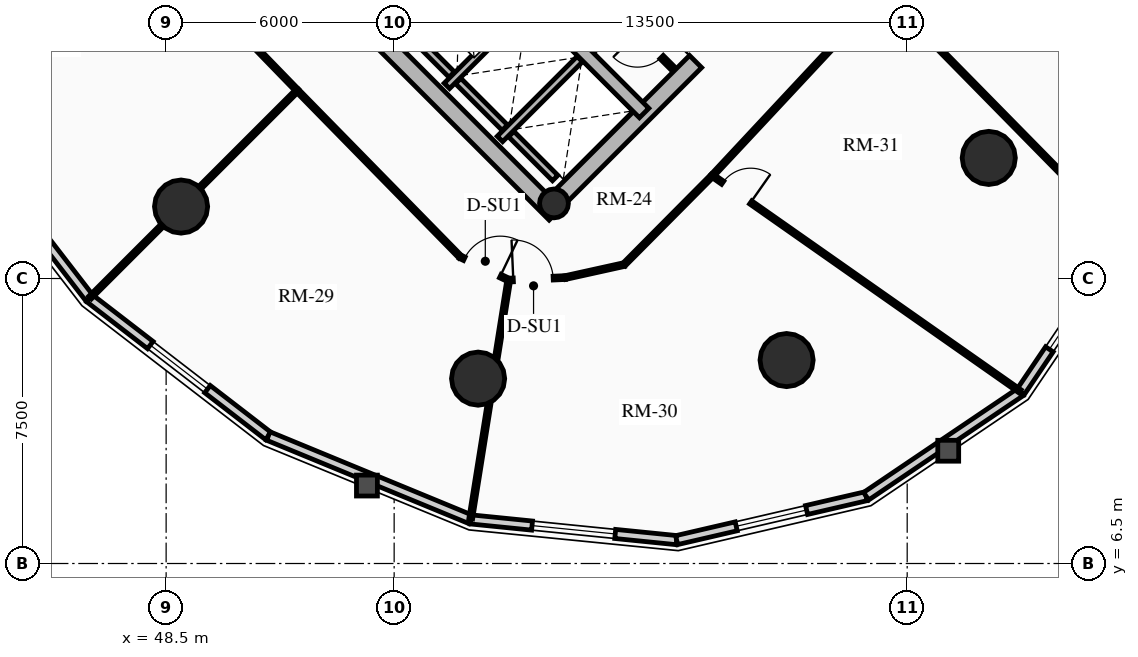
"""IFC4 building model, lengths in metres.
Left out: names, types, materials, properties, quantities, classifications, styles, units other than length and angle.
Written with IfcOpenShell. Run it as: python <this file> out.ifc"""

import sys

from ifc_helpers import new_model, si_unit, direction, frame, frame_2d, origin, origin_2d, place, context, subcontext, project, spatial, rectangle, circle, hollow_circle, extrude, source, transform, mapped, element, fill, save


model = new_model("IFC4")
c1 = context("Model", 3, precision=1e-05, world=origin(), true_north=direction((0.0, 1.0)))
c2 = subcontext(c1, "Body", "Model", "MODEL_VIEW")
j1 = project(units=[si_unit("LENGTHUNIT", "METRE"), si_unit("PLANEANGLEUNIT", "RADIAN")], contexts=[c1])
p1 = place(None, origin())
s1 = spatial("IfcSite", under=j1, at=p1, CompositionType="ELEMENT")
p2 = place(p1, origin())
s2 = spatial("IfcBuilding", under=s1, at=p2, CompositionType="ELEMENT")
p3 = place(p2, frame((0.0, 0.0, 96.34)))
s3 = spatial("IfcBuildingStorey", under=s2, at=p3, CompositionType="ELEMENT", Elevation=96.34)
p4 = place(p3, frame((58.737, 15.697, 0.0), z_axis=(0.0, 0.0, 1.0), x_axis=(-0.707106781187, 0.707106781187, 0.0)))
e1 = element("IfcWall", 1, at=p4, inside=s3, PredefinedType="SHEAR", context=c2, shape_type="SweptSolid", body=[
    extrude(rectangle(XDim=14.2, YDim=0.45, at=frame_2d((7.1, 0.0))), origin(), (0.0, 0.0, 1.0), 2.91),
])
p5 = place(p3, frame((58.578, 15.856, 0.0), z_axis=(0.0, 0.0, 1.0), x_axis=(0.707106781187, 0.707106781187, 0.0)))
e2 = element("IfcWall", 2, at=p5, inside=s3, PredefinedType="SHEAR", context=c2, shape_type="SweptSolid", body=[
    extrude(rectangle(XDim=10.7, YDim=0.45, at=frame_2d((5.35, 0.0))), origin(), (0.0, 0.0, 1.0), 2.91),
])
m1 = source(origin(), c2, "Body", "SweptSolid", [
    extrude(rectangle(XDim=1.5, YDim=2.02, at=frame_2d((0.75, 1.01))), frame((0.0, 0.235, 0.0), z_axis=(0.0, -1.0, 0.0), x_axis=(1.0, 0.0, 0.0)), (0.0, 0.0, 1.0), 0.47),
])
p6 = place(p5, frame((5.45, 0.0, 0.0)))
e3 = element("IfcOpeningElement", 3, at=p6, cuts=e2, PredefinedType="OPENING", context=c2, shape_type="MappedRepresentation", body=[
    mapped(m1, transform((0.0, 0.0, 0.0), x_axis=(1.0, 0.0, 0.0), y_axis=(0.0, 1.0, 0.0), z_axis=(0.0, 0.0, 1.0), scale=1.0)),
])
p7 = place(p3, frame((61.078, 18.355, 0.0), z_axis=(0.0, 0.0, 1.0), x_axis=(-0.707106781187, 0.707106781187, 0.0)))
e4 = element("IfcWall", 4, at=p7, inside=s3, PredefinedType="SHEAR", context=c2, shape_type="SweptSolid", body=[
    extrude(rectangle(XDim=13.75, YDim=0.35, at=frame_2d((6.875, 0.0))), origin(), (0.0, 0.0, 1.0), 2.91),
])
m2 = source(origin(), c2, "Body", "SweptSolid", [
    extrude(rectangle(XDim=1.1, YDim=2.015, at=frame_2d((0.55, 1.007))), frame((0.0, 0.185, 0.0), z_axis=(0.0, -1.0, 0.0), x_axis=(1.0, 0.0, 0.0)), (0.0, 0.0, 1.0), 0.37),
])
p8 = place(p7, frame((4.875, 0.0, 0.0)))
e5 = element("IfcOpeningElement", 5, at=p8, cuts=e4, PredefinedType="OPENING", context=c2, shape_type="MappedRepresentation", body=[
    mapped(m2, transform((0.0, 0.0, 0.0), x_axis=(1.0, 0.0, 0.0), y_axis=(0.0, 1.0, 0.0), z_axis=(0.0, 0.0, 1.0), scale=1.0)),
])
m3 = source(origin(), c2, "Body", "SweptSolid", [
    extrude(rectangle(XDim=1.15, YDim=2.02, at=frame_2d((0.575, 1.01))), frame((0.0, 0.185, 0.0), z_axis=(0.0, -1.0, 0.0), x_axis=(1.0, 0.0, 0.0)), (0.0, 0.0, 1.0), 0.37),
])
p9 = place(p7, frame((7.295, 0.0, 0.0)))
e6 = element("IfcOpeningElement", 6, at=p9, cuts=e4, PredefinedType="OPENING", context=c2, shape_type="MappedRepresentation", body=[
    mapped(m3, transform((0.0, 0.0, 0.0), x_axis=(1.0, 0.0, 0.0), y_axis=(0.0, 1.0, 0.0), z_axis=(0.0, 0.0, 1.0), scale=1.0)),
])
p10 = place(p3, frame((58.706, 15.976, 0.0), z_axis=(0.0, 0.0, 1.0), x_axis=(0.707106781187, 0.707106781187, 0.0)))
e7 = element("IfcColumn", 7, at=p10, inside=s3, PredefinedType="COLUMN", context=c2, shape_type="SweptSolid", body=[
    extrude(hollow_circle(Radius=0.38, WallThickness=0.032, at=origin_2d()), origin(), (0.0, 0.0, 1.0), 2.91),
])
for number, where, z_axis, x_axis in (
    (8, (48.893, 15.893, 0.0), (0.0, 0.0, 1.0), (1.0, 0.0, 0.0)),
    (9, (56.709, 11.365, 0.0), (0.0, 0.0, 1.0), (1.0, 0.0, 0.0)),
    (10, (64.827, 11.854, 0.0), (0.0, 0.0, 1.0), (1.0, 0.0, 0.0)),
    (11, (70.146, 17.173, 0.0), (0.0, 0.0, 1.0), (1.0, 0.0, 0.0)),
):
    element("IfcColumn", number, at=place(p3, frame(where, z_axis=z_axis, x_axis=x_axis)), inside=s3, PredefinedType="USERDEFINED", context=c2, shape_type="SweptSolid", body=[
        extrude(circle(Radius=0.7, at=origin_2d()), origin(), (0.0, 0.0, 1.0), 2.91),
    ])
p11 = place(p3, frame((46.483, 13.483, 0.0), z_axis=(0.0, 0.0, 1.0), x_axis=(-0.61054437102, 0.791982052206, 0.0)))
e12 = element("IfcWall", 12, at=p11, inside=s3, PredefinedType="SOLIDWALL", context=c2, shape_type="SweptSolid", body=[
    extrude(rectangle(XDim=5.942, YDim=0.24, at=frame_2d((2.971, 0.0))), origin(), (0.0, 0.0, 1.0), 2.179),
])
p12 = place(p3, frame((51.189, 9.855, 0.0), z_axis=(0.0, 0.0, 1.0), x_axis=(-0.791982052206, 0.61054437102, 0.0)))
e13 = element("IfcWall", 13, at=p12, inside=s3, PredefinedType="SOLIDWALL", context=c2, shape_type="SweptSolid", body=[
    extrude(rectangle(XDim=5.942, YDim=0.24, at=frame_2d((2.971, 0.0))), origin(), (0.0, 0.0, 1.0), 2.179),
])
m4 = source(origin(), c2, "Body", "SweptSolid", [
    extrude(rectangle(XDim=1.9, YDim=1.35, at=frame_2d((0.95, 0.675))), frame((0.0, 0.13, 0.0), z_axis=(0.0, -1.0, 0.0), x_axis=(1.0, 0.0, 0.0)), (0.0, 0.0, 1.0), 0.26),
])
p13 = place(p12, frame((2.021, 0.0, 0.65)))
e14 = element("IfcOpeningElement", 14, at=p13, cuts=e13, PredefinedType="OPENING", context=c2, shape_type="MappedRepresentation", body=[
    mapped(m4, transform((0.0, 0.0, 0.0), x_axis=(1.0, 0.0, 0.0), y_axis=(0.0, 1.0, 0.0), z_axis=(0.0, 0.0, 1.0), scale=1.0)),
])
p14 = place(p3, frame((56.513, 7.661, 0.0), z_axis=(0.0, 0.0, 1.0), x_axis=(-0.924563909604, 0.381027003055, 0.0)))
e15 = element("IfcWall", 15, at=p14, inside=s3, PredefinedType="SOLIDWALL", context=c2, shape_type="SweptSolid", body=[
    extrude(rectangle(XDim=5.758, YDim=0.24, at=frame_2d((2.879, 0.0))), origin(), (0.0, 0.0, 1.0), 2.179),
])
p15 = place(p3, frame((61.933, 7.115, 0.0), z_axis=(0.0, 0.0, 1.0), x_axis=(-0.994971754311, 0.10015591906, 0.0)))
e16 = element("IfcWall", 16, at=p15, inside=s3, PredefinedType="SOLIDWALL", context=c2, shape_type="SweptSolid", body=[
    extrude(rectangle(XDim=5.448, YDim=0.24, at=frame_2d((2.724, 0.0))), origin(), (0.0, 0.0, 1.0), 2.179),
])
m5 = source(origin(), c2, "Body", "SweptSolid", [
    extrude(rectangle(XDim=2.2, YDim=1.35, at=frame_2d((1.1, 0.675))), frame((0.0, 0.13, 0.0), z_axis=(0.0, -1.0, 0.0), x_axis=(1.0, 0.0, 0.0)), (0.0, 0.0, 1.0), 0.26),
])
p16 = place(p15, frame((1.624, 0.0, 0.65)))
e17 = element("IfcOpeningElement", 17, at=p16, cuts=e16, PredefinedType="OPENING", context=c2, shape_type="MappedRepresentation", body=[
    mapped(m5, transform((0.0, 0.0, 0.0), x_axis=(1.0, 0.0, 0.0), y_axis=(0.0, 1.0, 0.0), z_axis=(0.0, 0.0, 1.0), scale=1.0)),
])
p17 = place(p3, frame((66.92, 8.271, 0.0), z_axis=(0.0, 0.0, 1.0), x_axis=(-0.974165631126, -0.225834725257, 0.0)))
e18 = element("IfcWall", 18, at=p17, inside=s3, PredefinedType="SOLIDWALL", context=c2, shape_type="SweptSolid", body=[
    extrude(rectangle(XDim=5.119, YDim=0.24, at=frame_2d((2.56, 0.0))), origin(), (0.0, 0.0, 1.0), 2.179),
])
p18 = place(p17, frame((1.609, 0.0, 0.65)))
e19 = element("IfcOpeningElement", 19, at=p18, cuts=e18, PredefinedType="OPENING", context=c2, shape_type="MappedRepresentation", body=[
    mapped(m4, transform((0.0, 0.0, 0.0), x_axis=(1.0, 0.0, 0.0), y_axis=(0.0, 1.0, 0.0), z_axis=(0.0, 0.0, 1.0), scale=1.0)),
])
p19 = place(p3, frame((70.985, 11.015, 0.0), z_axis=(0.0, 0.0, 1.0), x_axis=(-0.828781148131, -0.559572880421, 0.0)))
e20 = element("IfcWall", 20, at=p19, inside=s3, PredefinedType="SOLIDWALL", context=c2, shape_type="SweptSolid", body=[
    extrude(rectangle(XDim=4.905, YDim=0.24, at=frame_2d((2.452, 0.0))), origin(), (0.0, 0.0, 1.0), 2.179),
])
p20 = place(p3, frame((73.729, 15.08, 0.0), z_axis=(0.0, 0.0, 1.0), x_axis=(-0.559572880421, -0.828781148131, 0.0)))
e21 = element("IfcWall", 21, at=p20, inside=s3, PredefinedType="SOLIDWALL", context=c2, shape_type="SweptSolid", body=[
    extrude(rectangle(XDim=4.905, YDim=0.24, at=frame_2d((2.452, 0.0))), origin(), (0.0, 0.0, 1.0), 2.179),
])
p21 = place(p20, frame((1.352, 0.0, 0.65)))
e22 = element("IfcOpeningElement", 22, at=p21, cuts=e21, PredefinedType="OPENING", context=c2, shape_type="MappedRepresentation", body=[
    mapped(m5, transform((0.0, 0.0, 0.0), x_axis=(1.0, 0.0, 0.0), y_axis=(0.0, 1.0, 0.0), z_axis=(0.0, 0.0, 1.0), scale=1.0)),
])
p22 = place(p3, frame((55.888, 19.069, 0.0), z_axis=(0.0, 0.0, 1.0), x_axis=(0.707106781187, 0.707106781187, 0.0)))
e23 = element("IfcWall", 23, at=p22, inside=s3, PredefinedType="SHEAR", context=c2, shape_type="SweptSolid", body=[
    extrude(rectangle(XDim=2.97, YDim=0.2, at=frame_2d((1.485, 0.0))), origin(), (0.0, 0.0, 1.0), 2.91),
])
p23 = place(p3, frame((56.015, 19.366, 0.0), z_axis=(0.0, 0.0, 1.0), x_axis=(-0.707106781187, 0.707106781187, 0.0)))
e24 = element("IfcWall", 24, at=p23, inside=s3, PredefinedType="SHEAR", context=c2, shape_type="SweptSolid", body=[
    extrude(rectangle(XDim=2.44, YDim=0.2, at=frame_2d((1.22, 0.0))), origin(), (0.0, 0.0, 1.0), 2.91),
])
p24 = place(p3, frame((57.284, 17.673, 0.0), z_axis=(0.0, 0.0, 1.0), x_axis=(0.707147878904, 0.70706568108, 0.0)))
e25 = element("IfcWall", 25, at=p24, inside=s3, PredefinedType="SHEAR", context=c2, shape_type="SweptSolid", body=[
    extrude(rectangle(XDim=2.97, YDim=0.2, at=frame_2d((1.485, 0.0))), origin(), (0.0, 0.0, 1.0), 2.91),
])
p25 = place(p3, frame((57.412, 17.97, 0.0), z_axis=(0.0, 0.0, 1.0), x_axis=(-0.707106781187, 0.707106781187, 0.0)))
e26 = element("IfcWall", 26, at=p25, inside=s3, PredefinedType="SHEAR", context=c2, shape_type="SweptSolid", body=[
    extrude(rectangle(XDim=1.735, YDim=0.2, at=frame_2d((0.867, 0.0))), origin(), (0.0, 0.0, 1.0), 2.91),
])
p26 = place(p3, frame((58.737, 16.644, 0.0), z_axis=(0.0, 0.0, 1.0), x_axis=(-0.707032117043, 0.707181437447, 0.0)))
e27 = element("IfcWall", 27, at=p26, inside=s3, PredefinedType="SHEAR", context=c2, shape_type="SweptSolid", body=[
    extrude(rectangle(XDim=1.635, YDim=0.2, at=frame_2d((0.817, 0.0))), origin(), (0.0, 0.0, 1.0), 2.91),
])
p27 = place(p3, frame((61.835, 19.529, 0.0), z_axis=(0.0, 0.0, 1.0), x_axis=(-0.707174592913, 0.707038962956, 0.0)))
e28 = element("IfcWall", 28, at=p27, inside=s3, PredefinedType="PARTITIONING", context=c2, shape_type="SweptSolid", body=[
    extrude(rectangle(XDim=1.8, YDim=0.125, at=frame_2d((0.9, 0.0))), origin(), (0.0, 0.0, 1.0), 2.655),
])
m6 = source(origin(), c2, "Body", "SweptSolid", [
    extrude(rectangle(XDim=0.9, YDim=2.005, at=frame_2d((0.45, 1.002))), frame((0.0, 0.073, 0.0), z_axis=(0.0, -1.0, 0.0), x_axis=(1.0, 0.0, 0.0)), (0.0, 0.0, 1.0), 0.145),
])
p28 = place(p27, frame((0.42, 0.0, 0.0)))
e29 = element("IfcOpeningElement", 29, at=p28, cuts=e28, PredefinedType="OPENING", context=c2, shape_type="MappedRepresentation", body=[
    mapped(m6, transform((0.0, 0.0, 0.0), x_axis=(1.0, 0.0, 0.0), y_axis=(0.0, 1.0, 0.0), z_axis=(0.0, 0.0, 1.0), scale=1.0)),
])
p29 = place(p3, frame((47.763, 23.265, 0.0), z_axis=(0.0, 0.0, 1.0), x_axis=(0.696243493404, -0.717805682544, 0.0)))
e30 = element("IfcWall", 30, at=p29, inside=s3, PredefinedType="MOVABLE", context=c2, shape_type="SweptSolid", body=[
    extrude(rectangle(XDim=6.012, YDim=0.1, at=frame_2d((3.006, 0.0))), origin(), (0.0, 0.0, 1.0), 2.655),
])
m7 = source(origin(), c2, "Body", "SweptSolid", [
    extrude(rectangle(XDim=1.05, YDim=2.015, at=frame_2d((0.525, 1.007))), frame((0.0, 0.06, 0.0), z_axis=(0.0, -1.0, 0.0), x_axis=(1.0, 0.0, 0.0)), (0.0, 0.0, 1.0), 0.12),
])
p30 = place(p29, frame((2.481, 0.0, 0.0)))
e31 = element("IfcOpeningElement", 31, at=p30, cuts=e30, PredefinedType="OPENING", context=c2, shape_type="MappedRepresentation", body=[
    mapped(m7, transform((0.0, 0.0, 0.0), x_axis=(1.0, 0.0, 0.0), y_axis=(0.0, 1.0, 0.0), z_axis=(0.0, 0.0, 1.0), scale=1.0)),
])
p31 = place(p3, frame((51.949, 18.949, 0.0), z_axis=(0.0, 0.0, 1.0), x_axis=(0.699840807936, -0.714298847506, 0.0)))
e32 = element("IfcWall", 32, at=p31, inside=s3, PredefinedType="MOVABLE", context=c2, shape_type="SweptSolid", body=[
    extrude(rectangle(XDim=6.13, YDim=0.1, at=frame_2d((3.065, 0.0))), origin(), (0.0, 0.0, 1.0), 2.225),
])
p32 = place(p3, frame((56.239, 14.571, 0.0), z_axis=(0.0, 0.0, 1.0), x_axis=(0.901549955153, -0.432675026278, 0.0)))
e33 = element("IfcWall", 33, at=p32, inside=s3, PredefinedType="MOVABLE", context=c2, shape_type="SweptSolid", body=[
    extrude(rectangle(XDim=1.416, YDim=0.1, at=frame_2d((0.708, 0.0))), origin(), (0.0, 0.0, 1.0), 2.225),
])
p33 = place(p32, frame((0.12, 0.0, 0.0)))
e34 = element("IfcOpeningElement", 34, at=p33, cuts=e33, PredefinedType="OPENING", context=c2, shape_type="MappedRepresentation", body=[
    mapped(m7, transform((0.0, 0.0, 0.0), x_axis=(1.0, 0.0, 0.0), y_axis=(0.0, 1.0, 0.0), z_axis=(0.0, 0.0, 1.0), scale=1.0)),
])
p34 = place(p3, frame((57.516, 13.958, 0.0), z_axis=(0.0, 0.0, 1.0), x_axis=(0.999005711776, 0.044582371387, 0.0)))
e35 = element("IfcWall", 35, at=p34, inside=s3, PredefinedType="MOVABLE", context=c2, shape_type="SweptSolid", body=[
    extrude(rectangle(XDim=1.49, YDim=0.1, at=frame_2d((0.745, 0.0))), origin(), (0.0, 0.0, 1.0), 2.225),
])
p35 = place(p34, frame((0.12, 0.0, 0.0)))
e36 = element("IfcOpeningElement", 36, at=p35, cuts=e35, PredefinedType="OPENING", context=c2, shape_type="MappedRepresentation", body=[
    mapped(m7, transform((0.0, 0.0, 0.0), x_axis=(1.0, 0.0, 0.0), y_axis=(0.0, 1.0, 0.0), z_axis=(0.0, 0.0, 1.0), scale=1.0)),
])
p36 = place(p3, frame((59.004, 14.024, 0.0), z_axis=(0.0, 0.0, 1.0), x_axis=(0.976436847881, 0.215803341262, 0.0)))
e37 = element("IfcWall", 37, at=p36, inside=s3, PredefinedType="MOVABLE", context=c2, shape_type="SweptSolid", body=[
    extrude(rectangle(XDim=1.583, YDim=0.1, at=frame_2d((0.792, 0.0))), origin(), (0.0, 0.0, 1.0), 2.225),
])
p37 = place(p3, frame((60.549, 14.366, 0.0), z_axis=(0.0, 0.0, 1.0), x_axis=(0.704402344516, 0.709800913666, 0.0)))
e38 = element("IfcWall", 38, at=p37, inside=s3, PredefinedType="MOVABLE", context=c2, shape_type="SweptSolid", body=[
    extrude(rectangle(XDim=3.301, YDim=0.1, at=frame_2d((1.651, 0.0))), origin(), (0.0, 0.0, 1.0), 2.225),
])
p38 = place(p3, frame((62.875, 16.709, 0.0), z_axis=(0.0, 0.0, 1.0), x_axis=(0.682290572861, 0.731081099595, 0.0)))
e39 = element("IfcWall", 39, at=p38, inside=s3, PredefinedType="MOVABLE", context=c2, shape_type="SweptSolid", body=[
    extrude(rectangle(XDim=6.6, YDim=0.1, at=frame_2d((3.3, 0.0))), origin(), (0.0, 0.0, 1.0), 2.225),
])
p39 = place(p3, frame((51.949, 18.949, 0.0), z_axis=(0.0, 0.0, 1.0), x_axis=(-0.707106781187, -0.707106781187, 0.0)))
e40 = element("IfcWall", 40, at=p39, inside=s3, PredefinedType="MOVABLE", context=c2, shape_type="SweptSolid", body=[
    extrude(rectangle(XDim=7.711, YDim=0.1, at=frame_2d((3.855, 0.0))), origin(), (0.0, 0.0, 1.0), 2.179),
])
p40 = place(p3, frame((57.516, 13.958, 0.0), z_axis=(0.0, 0.0, 1.0), x_axis=(-0.157313405462, -0.987548729158, 0.0)))
e41 = element("IfcWall", 41, at=p40, inside=s3, PredefinedType="MOVABLE", context=c2, shape_type="SweptSolid", body=[
    extrude(rectangle(XDim=6.357, YDim=0.1, at=frame_2d((3.178, 0.0))), origin(), (0.0, 0.0, 1.0), 2.179),
])
p41 = place(p3, frame((67.378, 21.534, 0.0), z_axis=(0.0, 0.0, 1.0), x_axis=(0.700878918497, -0.713280268622, 0.0)))
e42 = element("IfcWall", 42, at=p41, inside=s3, PredefinedType="MOVABLE", context=c2, shape_type="SweptSolid", body=[
    extrude(rectangle(XDim=9.036, YDim=0.1, at=frame_2d((4.518, 0.0))), origin(), (0.0, 0.0, 1.0), 2.179),
])
p42 = place(p3, frame((62.875, 16.709, 0.0), z_axis=(0.0, 0.0, 1.0), x_axis=(0.818628370173, -0.574323594804, 0.0)))
e43 = element("IfcWall", 43, at=p42, inside=s3, PredefinedType="MOVABLE", context=c2, shape_type="SweptSolid", body=[
    extrude(rectangle(XDim=9.889, YDim=0.1, at=frame_2d((4.945, 0.0))), origin(), (0.0, 0.0, 1.0), 2.179),
])
m8 = source(origin(), c2, "Body", "SweptSolid", [
    extrude(rectangle(XDim=0.9, YDim=2.005, at=frame_2d((0.45, 1.002))), frame((0.0, 0.06, 0.0), z_axis=(0.0, -1.0, 0.0), x_axis=(1.0, 0.0, 0.0)), (0.0, 0.0, 1.0), 0.12),
])
p43 = place(p42, frame((0.33, 0.0, 0.0)))
e44 = element("IfcOpeningElement", 44, at=p43, cuts=e43, PredefinedType="OPENING", context=c2, shape_type="MappedRepresentation", body=[
    mapped(m8, transform((0.0, 0.0, 0.0), x_axis=(1.0, 0.0, 0.0), y_axis=(0.0, 1.0, 0.0), z_axis=(0.0, 0.0, 1.0), scale=1.0)),
])
m9 = source(origin(), c2, "Body", "SweptSolid", [
    extrude(rectangle(XDim=1.9, YDim=1.35, at=frame_2d((0.95, 0.675))), frame((0.0, 0.03, 0.0), z_axis=(0.0, -1.0, 0.0), x_axis=(1.0, 0.0, 0.0)), (0.0, 0.0, 1.0), 0.06),
])
p44 = place(p13, origin())
e45 = element("IfcWindow", 45, at=p44, inside=s3, PartitioningType="DOUBLE_PANEL_VERTICAL", PredefinedType="WINDOW", context=c2, shape_type="MappedRepresentation", body=[
    mapped(m9, transform((0.0, 0.0, 0.0), x_axis=(1.0, 0.0, 0.0), y_axis=(0.0, 1.0, 0.0), z_axis=(0.0, 0.0, 1.0), scale=1.0)),
])
fill(e14, e45)
m10 = source(origin(), c2, "Body", "SweptSolid", [
    extrude(rectangle(XDim=2.2, YDim=1.35, at=frame_2d((1.1, 0.675))), frame((0.0, 0.03, 0.0), z_axis=(0.0, -1.0, 0.0), x_axis=(1.0, 0.0, 0.0)), (0.0, 0.0, 1.0), 0.06),
])
p45 = place(p16, origin())
e46 = element("IfcWindow", 46, at=p45, inside=s3, PartitioningType="DOUBLE_PANEL_VERTICAL", PredefinedType="WINDOW", context=c2, shape_type="MappedRepresentation", body=[
    mapped(m10, transform((0.0, 0.0, 0.0), x_axis=(1.0, 0.0, 0.0), y_axis=(0.0, 1.0, 0.0), z_axis=(0.0, 0.0, 1.0), scale=1.0)),
])
fill(e17, e46)
p46 = place(p18, origin())
e47 = element("IfcWindow", 47, at=p46, inside=s3, PartitioningType="DOUBLE_PANEL_VERTICAL", PredefinedType="WINDOW", context=c2, shape_type="MappedRepresentation", body=[
    mapped(m9, transform((0.0, 0.0, 0.0), x_axis=(1.0, 0.0, 0.0), y_axis=(0.0, 1.0, 0.0), z_axis=(0.0, 0.0, 1.0), scale=1.0)),
])
fill(e19, e47)
p47 = place(p21, origin())
e48 = element("IfcWindow", 48, at=p47, inside=s3, PartitioningType="DOUBLE_PANEL_VERTICAL", PredefinedType="WINDOW", context=c2, shape_type="MappedRepresentation", body=[
    mapped(m10, transform((0.0, 0.0, 0.0), x_axis=(1.0, 0.0, 0.0), y_axis=(0.0, 1.0, 0.0), z_axis=(0.0, 0.0, 1.0), scale=1.0)),
])
fill(e22, e48)
m11 = source(origin(), c2, "Body", "SweptSolid", [
    extrude(rectangle(XDim=1.5, YDim=2.02, at=frame_2d((0.75, 1.01))), frame((0.0, 0.025, 0.0), z_axis=(0.0, -1.0, 0.0), x_axis=(1.0, 0.0, 0.0)), (0.0, 0.0, 1.0), 0.05),
])
p48 = place(p6, origin())
e49 = element("IfcDoor", 49, at=p48, inside=s3, OperationType="DOUBLE_DOOR_SINGLE_SWING", PredefinedType="DOOR", context=c2, shape_type="MappedRepresentation", body=[
    mapped(m11, transform((0.0, 0.0, 0.0), x_axis=(1.0, 0.0, 0.0), y_axis=(0.0, 1.0, 0.0), z_axis=(0.0, 0.0, 1.0), scale=1.0)),
])
fill(e3, e49)
m12 = source(origin(), c2, "Body", "SweptSolid", [
    extrude(rectangle(XDim=0.9, YDim=2.005, at=frame_2d((0.45, 1.002))), frame((0.0, 0.025, 0.0), z_axis=(0.0, -1.0, 0.0), x_axis=(1.0, 0.0, 0.0)), (0.0, 0.0, 1.0), 0.05),
])
p49 = place(p28, origin())
e50 = element("IfcDoor", 50, at=p49, inside=s3, OperationType="SINGLE_SWING_RIGHT", PredefinedType="DOOR", context=c2, shape_type="MappedRepresentation", body=[
    mapped(m12, transform((0.0, 0.0, 0.0), x_axis=(1.0, 0.0, 0.0), y_axis=(0.0, 1.0, 0.0), z_axis=(0.0, 0.0, 1.0), scale=1.0)),
])
fill(e29, e50)
m13 = source(origin(), c2, "Body", "SweptSolid", [
    extrude(rectangle(XDim=1.05, YDim=2.015, at=frame_2d((0.525, 1.007))), frame((0.0, 0.025, 0.0), z_axis=(0.0, -1.0, 0.0), x_axis=(1.0, 0.0, 0.0)), (0.0, 0.0, 1.0), 0.05),
])
p50 = place(p33, origin())
e51 = element("IfcDoor", 51, at=p50, inside=s3, OperationType="SINGLE_SWING_RIGHT", PredefinedType="DOOR", context=c2, shape_type="MappedRepresentation", body=[
    mapped(m13, transform((0.0, 0.0, 0.0), x_axis=(1.0, 0.0, 0.0), y_axis=(0.0, 1.0, 0.0), z_axis=(0.0, 0.0, 1.0), scale=1.0)),
])
fill(e34, e51)
p51 = place(p35, origin())
e52 = element("IfcDoor", 52, at=p51, inside=s3, OperationType="SINGLE_SWING_LEFT", PredefinedType="DOOR", context=c2, shape_type="MappedRepresentation", body=[
    mapped(m13, transform((0.0, 0.0, 0.0), x_axis=(1.0, 0.0, 0.0), y_axis=(0.0, 1.0, 0.0), z_axis=(0.0, 0.0, 1.0), scale=1.0)),
])
fill(e36, e52)
p52 = place(p43, origin())
e53 = element("IfcDoor", 53, at=p52, inside=s3, OperationType="SINGLE_SWING_RIGHT", PredefinedType="DOOR", context=c2, shape_type="MappedRepresentation", body=[
    mapped(m12, transform((0.0, 0.0, 0.0), x_axis=(1.0, 0.0, 0.0), y_axis=(0.0, 1.0, 0.0), z_axis=(0.0, 0.0, 1.0), scale=1.0)),
])
fill(e44, e53)
save(model, sys.argv[1])
